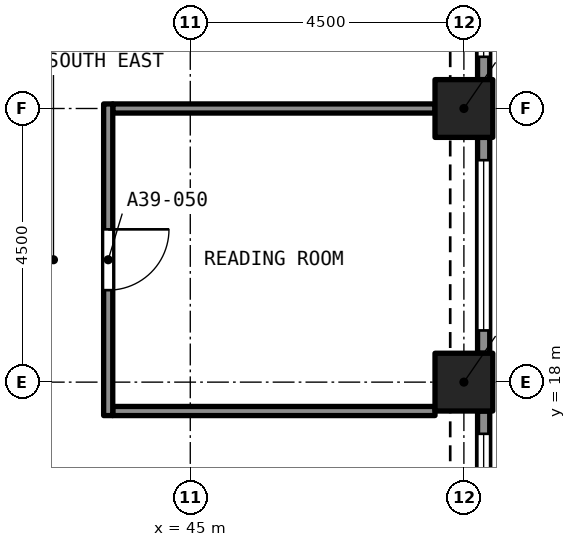
"""IFC4 building model, lengths in metres.
Left out: names, types, materials, properties, quantities, classifications, styles, units other than length and angle.
Written with IfcOpenShell. Run it as: python <this file> out.ifc"""

import sys

from ifc_helpers import new_model, si_unit, direction, frame, frame_2d, origin, origin_2d, place, context, subcontext, project, spatial, rectangle, extrude, element, fill, save


model = new_model("IFC4")
c1 = context("Model", 3, precision=1e-05, world=origin(), true_north=direction((0.0, 1.0)))
c2 = subcontext(c1, "Body", "Model", "MODEL_VIEW")
j1 = project(units=[si_unit("LENGTHUNIT", "METRE"), si_unit("PLANEANGLEUNIT", "RADIAN")], contexts=[c1])
p1 = place(None, origin())
s1 = spatial("IfcSite", under=j1, at=p1, CompositionType="ELEMENT")
p2 = place(p1, origin())
s2 = spatial("IfcBuilding", under=s1, at=p2, CompositionType="ELEMENT")
p3 = place(p2, frame((0.0, 0.0, 139.8)))
s3 = spatial("IfcBuildingStorey", under=s2, at=p3, CompositionType="ELEMENT", Elevation=139.8)
for number, where, z_axis, x_axis in (
    (1, (49.5, 18.0, 0.0), (0.0, 0.0, 1.0), (1.0, 0.0, 0.0)),
    (2, (49.5, 22.5, 0.0), (0.0, 0.0, 1.0), (1.0, 0.0, 0.0)),
):
    element("IfcColumn", number, at=place(p3, frame(where, z_axis=z_axis, x_axis=x_axis)), inside=s3, PredefinedType="COLUMN", context=c2, shape_type="SweptSolid", body=[
        extrude(rectangle(XDim=0.95, YDim=0.95, at=origin_2d()), origin(), (0.0, 0.0, 1.0), 3.2),
    ])
p4 = place(p3, frame((49.825, 17.525, 0.0), z_axis=(0.0, 0.0, 1.0), x_axis=(0.0, -1.0, 0.0)))
e3 = element("IfcWall", 3, at=p4, inside=s3, PredefinedType="SOLIDWALL", context=c2, shape_type="SweptSolid", body=[
    extrude(rectangle(XDim=3.55, YDim=0.2, at=frame_2d((1.775, 0.0))), origin(), (0.0, 0.0, 1.0), 3.2),
])
p5 = place(p4, frame((0.375, 0.0, 0.45)))
e4 = element("IfcOpeningElement", 4, at=p5, cuts=e3, PredefinedType="OPENING", context=c2, shape_type="SweptSolid", body=[
    extrude(rectangle(XDim=2.8, YDim=1.95, at=frame_2d((1.4, 0.975))), frame((0.0, 0.11, 0.0), z_axis=(0.0, -1.0, 0.0), x_axis=(1.0, 0.0, 0.0)), (0.0, 0.0, 1.0), 0.22),
])
p6 = place(p3, frame((49.825, 22.025, 0.0), z_axis=(0.0, 0.0, 1.0), x_axis=(0.0, -1.0, 0.0)))
e5 = element("IfcWall", 5, at=p6, inside=s3, PredefinedType="SOLIDWALL", context=c2, shape_type="SweptSolid", body=[
    extrude(rectangle(XDim=3.55, YDim=0.2, at=frame_2d((1.775, 0.0))), origin(), (0.0, 0.0, 1.0), 3.2),
])
p7 = place(p6, frame((0.375, 0.0, 0.45)))
e6 = element("IfcOpeningElement", 6, at=p7, cuts=e5, PredefinedType="OPENING", context=c2, shape_type="SweptSolid", body=[
    extrude(rectangle(XDim=2.8, YDim=1.95, at=frame_2d((1.4, 0.975))), frame((0.0, 0.11, 0.0), z_axis=(0.0, -1.0, 0.0), x_axis=(1.0, 0.0, 0.0)), (0.0, 0.0, 1.0), 0.22),
])
p8 = place(p3, frame((49.825, 26.525, 0.0), z_axis=(0.0, 0.0, 1.0), x_axis=(0.0, -1.0, 0.0)))
e7 = element("IfcWall", 7, at=p8, inside=s3, PredefinedType="SOLIDWALL", context=c2, shape_type="SweptSolid", body=[
    extrude(rectangle(XDim=3.55, YDim=0.2, at=frame_2d((1.775, 0.0))), origin(), (0.0, 0.0, 1.0), 3.2),
])
p9 = place(p8, frame((0.375, 0.0, 0.45)))
e8 = element("IfcOpeningElement", 8, at=p9, cuts=e7, PredefinedType="OPENING", context=c2, shape_type="SweptSolid", body=[
    extrude(rectangle(XDim=2.8, YDim=1.95, at=frame_2d((1.4, 0.975))), frame((0.0, 0.11, 0.0), z_axis=(0.0, -1.0, 0.0), x_axis=(1.0, 0.0, 0.0)), (0.0, 0.0, 1.0), 0.22),
])
for number, where, z_axis, x_axis in (
    (9, (43.725, 17.525, 0.0), (0.0, 0.0, 1.0), (1.0, 0.0, 0.0)),
    (10, (43.725, 22.5, 0.0), (0.0, 0.0, 1.0), (1.0, 0.0, 0.0)),
):
    element("IfcWall", number, at=place(p3, frame(where, z_axis=z_axis, x_axis=x_axis)), inside=s3, PredefinedType="PARTITIONING", context=c2, shape_type="SweptSolid", body=[
        extrude(rectangle(XDim=5.3, YDim=0.15, at=frame_2d((2.65, 0.0))), origin(), (0.0, 0.0, 1.0), 2.9),
    ])
p10 = place(p3, frame((43.65, 22.575, 0.0), z_axis=(0.0, 0.0, 1.0), x_axis=(0.0, -1.0, 0.0)))
e11 = element("IfcWall", 11, at=p10, inside=s3, PredefinedType="PARTITIONING", context=c2, shape_type="SweptSolid", body=[
    extrude(rectangle(XDim=5.125, YDim=0.15, at=frame_2d((2.562, 0.0))), origin(), (0.0, 0.0, 1.0), 2.9),
])
p11 = place(p10, frame((2.062, 0.0, 0.0)))
e12 = element("IfcOpeningElement", 12, at=p11, cuts=e11, PredefinedType="OPENING", context=c2, shape_type="SweptSolid", body=[
    extrude(rectangle(XDim=1.0, YDim=2.1, at=frame_2d((0.5, 1.05))), frame((0.0, 0.085, 0.0), z_axis=(0.0, -1.0, 0.0), x_axis=(1.0, 0.0, 0.0)), (0.0, 0.0, 1.0), 0.17),
])
p12 = place(p5, origin())
e13 = element("IfcWindow", 13, at=p12, inside=s3, PartitioningType="SINGLE_PANEL", PredefinedType="WINDOW", context=c2, shape_type="SweptSolid", body=[
    extrude(rectangle(XDim=2.8, YDim=1.95, at=frame_2d((1.4, 0.975))), frame((0.0, 0.03, 0.0), z_axis=(0.0, -1.0, 0.0), x_axis=(1.0, 0.0, 0.0)), (0.0, 0.0, 1.0), 0.06),
])
fill(e4, e13)
p13 = place(p7, origin())
e14 = element("IfcWindow", 14, at=p13, inside=s3, PartitioningType="SINGLE_PANEL", PredefinedType="WINDOW", context=c2, shape_type="SweptSolid", body=[
    extrude(rectangle(XDim=2.8, YDim=1.95, at=frame_2d((1.4, 0.975))), frame((0.0, 0.03, 0.0), z_axis=(0.0, -1.0, 0.0), x_axis=(1.0, 0.0, 0.0)), (0.0, 0.0, 1.0), 0.06),
])
fill(e6, e14)
p14 = place(p9, origin())
e15 = element("IfcWindow", 15, at=p14, inside=s3, PartitioningType="SINGLE_PANEL", PredefinedType="WINDOW", context=c2, shape_type="SweptSolid", body=[
    extrude(rectangle(XDim=2.8, YDim=1.95, at=frame_2d((1.4, 0.975))), frame((0.0, 0.03, 0.0), z_axis=(0.0, -1.0, 0.0), x_axis=(1.0, 0.0, 0.0)), (0.0, 0.0, 1.0), 0.06),
])
fill(e8, e15)
p15 = place(p11, origin())
e16 = element("IfcDoor", 16, at=p15, inside=s3, OperationType="SINGLE_SWING_RIGHT", PredefinedType="DOOR", context=c2, shape_type="SweptSolid", body=[
    extrude(rectangle(XDim=1.0, YDim=2.1, at=frame_2d((0.5, 1.05))), frame((0.0, 0.025, 0.0), z_axis=(0.0, -1.0, 0.0), x_axis=(1.0, 0.0, 0.0)), (0.0, 0.0, 1.0), 0.05),
])
fill(e12, e16)
save(model, sys.argv[1])
